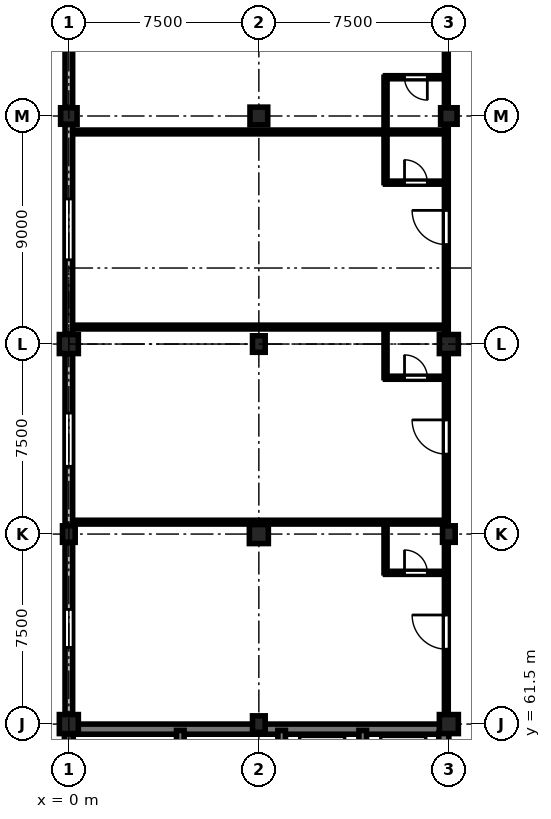
"""IFC4 building model, lengths in metres.
Left out: names, types, materials, properties, quantities, classifications, styles, units other than length and angle.
Written with IfcOpenShell. Run it as: python <this file> out.ifc"""

import sys

from ifc_helpers import new_model, si_unit, direction, frame, frame_2d, origin, origin_2d, place, context, subcontext, project, spatial, rectangle, extrude, element, fill, save


model = new_model("IFC4")
c1 = context("Model", 3, precision=1e-05, world=origin(), true_north=direction((0.0, 1.0)))
c2 = subcontext(c1, "Body", "Model", "MODEL_VIEW")
j1 = project(units=[si_unit("LENGTHUNIT", "METRE"), si_unit("PLANEANGLEUNIT", "RADIAN")], contexts=[c1])
p1 = place(None, origin())
s1 = spatial("IfcSite", under=j1, at=p1, CompositionType="ELEMENT")
p2 = place(p1, origin())
s2 = spatial("IfcBuilding", under=s1, at=p2, CompositionType="ELEMENT")
p3 = place(p2, frame((0.0, 0.0, 14.1)))
s3 = spatial("IfcBuildingStorey", under=s2, at=p3, CompositionType="ELEMENT", Elevation=14.1)
p4 = place(p3, frame((0.0, 61.5, 0.0), z_axis=(0.0, 0.0, 1.0), x_axis=(1.0, 0.0, 0.0)))
e1 = element("IfcColumn", 1, at=p4, inside=s3, PredefinedType="COLUMN", context=c2, shape_type="SweptSolid", body=[
    extrude(rectangle(XDim=0.75, YDim=0.75, at=origin_2d()), origin(), (0.0, 0.0, 1.0), 3.75),
])
p5 = place(p3, frame((0.0, 69.0, 0.0), z_axis=(0.0, 0.0, 1.0), x_axis=(1.0, 0.0, 0.0)))
e2 = element("IfcColumn", 2, at=p5, inside=s3, PredefinedType="COLUMN", context=c2, shape_type="SweptSolid", body=[
    extrude(rectangle(XDim=0.5, YDim=0.65, at=origin_2d()), origin(), (0.0, 0.0, 1.0), 3.75),
])
p6 = place(p3, frame((0.0, 76.5, 0.0), z_axis=(0.0, 0.0, 1.0), x_axis=(1.0, 0.0, 0.0)))
e3 = element("IfcColumn", 3, at=p6, inside=s3, PredefinedType="COLUMN", context=c2, shape_type="SweptSolid", body=[
    extrude(rectangle(XDim=0.75, YDim=0.75, at=origin_2d()), origin(), (0.0, 0.0, 1.0), 3.75),
])
p7 = place(p3, frame((0.0, 85.5, 0.0), z_axis=(0.0, 0.0, 1.0), x_axis=(1.0, 0.0, 0.0)))
e4 = element("IfcColumn", 4, at=p7, inside=s3, PredefinedType="COLUMN", context=c2, shape_type="SweptSolid", body=[
    extrude(rectangle(XDim=0.65, YDim=0.65, at=origin_2d()), origin(), (0.0, 0.0, 1.0), 3.75),
])
p8 = place(p3, frame((7.5, 61.5, 0.0), z_axis=(0.0, 0.0, 1.0), x_axis=(1.0, 0.0, 0.0)))
e5 = element("IfcColumn", 5, at=p8, inside=s3, PredefinedType="COLUMN", context=c2, shape_type="SweptSolid", body=[
    extrude(rectangle(XDim=0.5, YDim=0.65, at=origin_2d()), origin(), (0.0, 0.0, 1.0), 3.75),
])
p9 = place(p3, frame((7.5, 69.0, 0.0), z_axis=(0.0, 0.0, 1.0), x_axis=(1.0, 0.0, 0.0)))
e6 = element("IfcColumn", 6, at=p9, inside=s3, PredefinedType="COLUMN", context=c2, shape_type="SweptSolid", body=[
    extrude(rectangle(XDim=0.75, YDim=0.75, at=origin_2d()), origin(), (0.0, 0.0, 1.0), 3.75),
])
p10 = place(p3, frame((7.5, 76.5, 0.0), z_axis=(0.0, 0.0, 1.0), x_axis=(1.0, 0.0, 0.0)))
e7 = element("IfcColumn", 7, at=p10, inside=s3, PredefinedType="COLUMN", context=c2, shape_type="SweptSolid", body=[
    extrude(rectangle(XDim=0.5, YDim=0.65, at=origin_2d()), origin(), (0.0, 0.0, 1.0), 3.75),
])
p11 = place(p3, frame((7.5, 85.5, 0.0), z_axis=(0.0, 0.0, 1.0), x_axis=(1.0, 0.0, 0.0)))
e8 = element("IfcColumn", 8, at=p11, inside=s3, PredefinedType="COLUMN", context=c2, shape_type="SweptSolid", body=[
    extrude(rectangle(XDim=0.7, YDim=0.7, at=origin_2d()), origin(), (0.0, 0.0, 1.0), 3.75),
])
p12 = place(p3, frame((15.0, 61.5, 0.0), z_axis=(0.0, 0.0, 1.0), x_axis=(1.0, 0.0, 0.0)))
e9 = element("IfcColumn", 9, at=p12, inside=s3, PredefinedType="COLUMN", context=c2, shape_type="SweptSolid", body=[
    extrude(rectangle(XDim=0.75, YDim=0.75, at=origin_2d()), origin(), (0.0, 0.0, 1.0), 3.75),
])
p13 = place(p3, frame((15.0, 69.0, 0.0), z_axis=(0.0, 0.0, 1.0), x_axis=(1.0, 0.0, 0.0)))
e10 = element("IfcColumn", 10, at=p13, inside=s3, PredefinedType="COLUMN", context=c2, shape_type="SweptSolid", body=[
    extrude(rectangle(XDim=0.5, YDim=0.65, at=origin_2d()), origin(), (0.0, 0.0, 1.0), 3.75),
])
p14 = place(p3, frame((15.0, 76.5, 0.0), z_axis=(0.0, 0.0, 1.0), x_axis=(1.0, 0.0, 0.0)))
e11 = element("IfcColumn", 11, at=p14, inside=s3, PredefinedType="COLUMN", context=c2, shape_type="SweptSolid", body=[
    extrude(rectangle(XDim=0.75, YDim=0.75, at=origin_2d()), origin(), (0.0, 0.0, 1.0), 3.75),
])
p15 = place(p3, frame((15.0, 85.5, 0.0), z_axis=(0.0, 0.0, 1.0), x_axis=(1.0, 0.0, 0.0)))
e12 = element("IfcColumn", 12, at=p15, inside=s3, PredefinedType="COLUMN", context=c2, shape_type="SweptSolid", body=[
    extrude(rectangle(XDim=0.65, YDim=0.65, at=origin_2d()), origin(), (0.0, 0.0, 1.0), 3.75),
])
p16 = place(p3, frame((0.0, 54.335, 0.0), z_axis=(0.0, 0.0, 1.0), x_axis=(0.0, 1.0, 0.0)))
e13 = element("IfcWall", 13, at=p16, inside=s3, PredefinedType="SHEAR", context=c2, shape_type="SweptSolid", body=[
    extrude(rectangle(XDim=6.78, YDim=0.35, at=frame_2d((3.39, 0.0))), origin(), (0.0, 0.0, 1.0), 3.47),
])
p17 = place(p3, frame((0.0, 61.885, 0.0), z_axis=(0.0, 0.0, 1.0), x_axis=(0.0, 1.0, 0.0)))
e14 = element("IfcWall", 14, at=p17, inside=s3, PredefinedType="STANDARD", context=c2, shape_type="SweptSolid", body=[
    extrude(rectangle(XDim=6.78, YDim=0.3, at=frame_2d((3.39, 0.0))), origin(), (0.0, 0.0, 1.0), 2.87),
])
p18 = place(p17, frame((2.64, 0.0, 0.9)))
e15 = element("IfcOpeningElement", 15, at=p18, cuts=e14, PredefinedType="OPENING", context=c2, shape_type="SweptSolid", body=[
    extrude(rectangle(XDim=1.5, YDim=1.69, at=frame_2d((0.75, 0.845))), frame((0.0, 0.16, 0.0), z_axis=(0.0, -1.0, 0.0), x_axis=(1.0, 0.0, 0.0)), (0.0, 0.0, 1.0), 0.32),
])
p19 = place(p3, frame((0.0, 69.335, 0.0), z_axis=(0.0, 0.0, 1.0), x_axis=(0.0, 1.0, 0.0)))
e16 = element("IfcWall", 16, at=p19, inside=s3, PredefinedType="STANDARD", context=c2, shape_type="SweptSolid", body=[
    extrude(rectangle(XDim=6.78, YDim=0.3, at=frame_2d((3.39, 0.0))), origin(), (0.0, 0.0, 1.0), 2.87),
])
p20 = place(p19, frame((2.34, 0.0, 0.9)))
e17 = element("IfcOpeningElement", 17, at=p20, cuts=e16, PredefinedType="OPENING", context=c2, shape_type="SweptSolid", body=[
    extrude(rectangle(XDim=2.1, YDim=1.69, at=frame_2d((1.05, 0.845))), frame((0.0, 0.16, 0.0), z_axis=(0.0, -1.0, 0.0), x_axis=(1.0, 0.0, 0.0)), (0.0, 0.0, 1.0), 0.32),
])
p21 = place(p3, frame((0.0, 76.885, 0.0), z_axis=(0.0, 0.0, 1.0), x_axis=(0.0, 1.0, 0.0)))
e18 = element("IfcWall", 18, at=p21, inside=s3, PredefinedType="STANDARD", context=c2, shape_type="SweptSolid", body=[
    extrude(rectangle(XDim=8.28, YDim=0.3, at=frame_2d((4.14, 0.0))), origin(), (0.0, 0.0, 1.0), 2.92),
])
p22 = place(p21, frame((2.94, 0.0, 0.9)))
e19 = element("IfcOpeningElement", 19, at=p22, cuts=e18, PredefinedType="OPENING", context=c2, shape_type="SweptSolid", body=[
    extrude(rectangle(XDim=2.4, YDim=1.74, at=frame_2d((1.2, 0.87))), frame((0.0, 0.16, 0.0), z_axis=(0.0, -1.0, 0.0), x_axis=(1.0, 0.0, 0.0)), (0.0, 0.0, 1.0), 0.32),
])
p23 = place(p3, frame((0.0, 85.835, 0.0), z_axis=(0.0, 0.0, 1.0), x_axis=(0.0, 1.0, 0.0)))
e20 = element("IfcWall", 20, at=p23, inside=s3, PredefinedType="STANDARD", context=c2, shape_type="SweptSolid", body=[
    extrude(rectangle(XDim=6.855, YDim=0.3, at=frame_2d((3.427, 0.0))), origin(), (0.0, 0.0, 1.0), 2.87),
])
p24 = place(p23, frame((2.528, 0.0, 0.9)))
e21 = element("IfcOpeningElement", 21, at=p24, cuts=e20, PredefinedType="OPENING", context=c2, shape_type="SweptSolid", body=[
    extrude(rectangle(XDim=1.8, YDim=1.69, at=frame_2d((0.9, 0.845))), frame((0.0, 0.16, 0.0), z_axis=(0.0, -1.0, 0.0), x_axis=(1.0, 0.0, 0.0)), (0.0, 0.0, 1.0), 0.32),
])
p25 = place(p3, frame((0.35, 61.3, 0.0), z_axis=(0.0, 0.0, 1.0), x_axis=(1.0, 0.0, 0.0)))
e22 = element("IfcWall", 22, at=p25, inside=s3, PredefinedType="SHEAR", context=c2, shape_type="SweptSolid", body=[
    extrude(rectangle(XDim=14.3, YDim=0.4, at=frame_2d((7.15, 0.0))), origin(), (0.0, 0.0, 1.0), 3.47),
])
p26 = place(p3, frame((14.8, 58.1, 0.0), z_axis=(0.0, 0.0, 1.0), x_axis=(0.0, 1.0, 0.0)))
e23 = element("IfcWall", 23, at=p26, inside=s3, PredefinedType="SHEAR", context=c2, shape_type="SweptSolid", body=[
    extrude(rectangle(XDim=3.05, YDim=0.4, at=frame_2d((1.525, 0.0))), origin(), (0.0, 0.0, 1.0), 3.47),
])
for number, where, z_axis, x_axis in (
    (24, (4.4, 58.1, 0.0), (0.0, 0.0, 1.0), (0.0, 1.0, 0.0)),
    (25, (8.4, 58.1, 0.0), (0.0, 0.0, 1.0), (0.0, 1.0, 0.0)),
    (26, (11.6, 58.1, 0.0), (0.0, 0.0, 1.0), (0.0, 1.0, 0.0)),
):
    element("IfcWall", number, at=place(p3, frame(where, z_axis=z_axis, x_axis=x_axis)), inside=s3, PredefinedType="SHEAR", context=c2, shape_type="SweptSolid", body=[
        extrude(rectangle(XDim=3.15, YDim=0.3, at=frame_2d((1.575, 0.0))), origin(), (0.0, 0.0, 1.0), 3.47),
    ])
p27 = place(p3, frame((14.9, 61.93, 0.0), z_axis=(0.0, 0.0, 1.0), x_axis=(0.0, 1.0, 0.0)))
e27 = element("IfcWall", 27, at=p27, inside=s3, PredefinedType="PARTITIONING", context=c2, shape_type="SweptSolid", body=[
    extrude(rectangle(XDim=7.54, YDim=0.15, at=frame_2d((3.77, 0.0))), origin(), (0.0, 0.0, 1.0), 2.905),
])
p28 = place(p27, frame((2.526, 0.0, 0.0)))
e28 = element("IfcOpeningElement", 28, at=p28, cuts=e27, PredefinedType="OPENING", context=c2, shape_type="SweptSolid", body=[
    extrude(rectangle(XDim=1.35, YDim=2.25, at=frame_2d((0.675, 1.125))), frame((0.0, 0.085, 0.0), z_axis=(0.0, -1.0, 0.0), x_axis=(1.0, 0.0, 0.0)), (0.0, 0.0, 1.0), 0.17),
])
p29 = place(p3, frame((12.5, 67.47, 0.0), z_axis=(0.0, 0.0, 1.0), x_axis=(1.0, 0.0, 0.0)))
e29 = element("IfcWall", 29, at=p29, inside=s3, PredefinedType="PARTITIONING", context=c2, shape_type="SweptSolid", body=[
    extrude(rectangle(XDim=2.4, YDim=0.12, at=frame_2d((1.2, 0.0))), origin(), (0.0, 0.0, 1.0), 3.455),
])
p30 = place(p29, frame((0.75, 0.0, 0.0)))
e30 = element("IfcOpeningElement", 30, at=p30, cuts=e29, PredefinedType="OPENING", context=c2, shape_type="SweptSolid", body=[
    extrude(rectangle(XDim=0.9, YDim=2.1, at=frame_2d((0.45, 1.05))), frame((0.0, 0.07, 0.0), z_axis=(0.0, -1.0, 0.0), x_axis=(1.0, 0.0, 0.0)), (0.0, 0.0, 1.0), 0.14),
])
p31 = place(p3, frame((12.5, 67.47, 0.0), z_axis=(0.0, 0.0, 1.0), x_axis=(0.0, 1.0, 0.0)))
e31 = element("IfcWall", 31, at=p31, inside=s3, PredefinedType="PARTITIONING", context=c2, shape_type="SweptSolid", body=[
    extrude(rectangle(XDim=2.0, YDim=0.12, at=frame_2d((1.0, 0.0))), origin(), (0.0, 0.0, 1.0), 3.455),
])
p32 = place(p3, frame((14.9, 69.63, 0.0), z_axis=(0.0, 0.0, 1.0), x_axis=(0.0, 1.0, 0.0)))
e32 = element("IfcWall", 32, at=p32, inside=s3, PredefinedType="PARTITIONING", context=c2, shape_type="SweptSolid", body=[
    extrude(rectangle(XDim=7.54, YDim=0.15, at=frame_2d((3.77, 0.0))), origin(), (0.0, 0.0, 1.0), 2.755),
])
p33 = place(p32, frame((2.526, 0.0, 0.0)))
e33 = element("IfcOpeningElement", 33, at=p33, cuts=e32, PredefinedType="OPENING", context=c2, shape_type="SweptSolid", body=[
    extrude(rectangle(XDim=1.35, YDim=2.25, at=frame_2d((0.675, 1.125))), frame((0.0, 0.085, 0.0), z_axis=(0.0, -1.0, 0.0), x_axis=(1.0, 0.0, 0.0)), (0.0, 0.0, 1.0), 0.17),
])
p34 = place(p3, frame((12.5, 75.17, 0.0), z_axis=(0.0, 0.0, 1.0), x_axis=(1.0, 0.0, 0.0)))
e34 = element("IfcWall", 34, at=p34, inside=s3, PredefinedType="PARTITIONING", context=c2, shape_type="SweptSolid", body=[
    extrude(rectangle(XDim=2.4, YDim=0.12, at=frame_2d((1.2, 0.0))), origin(), (0.0, 0.0, 1.0), 3.455),
])
p35 = place(p34, frame((0.75, 0.0, 0.0)))
e35 = element("IfcOpeningElement", 35, at=p35, cuts=e34, PredefinedType="OPENING", context=c2, shape_type="SweptSolid", body=[
    extrude(rectangle(XDim=0.9, YDim=2.1, at=frame_2d((0.45, 1.05))), frame((0.0, 0.07, 0.0), z_axis=(0.0, -1.0, 0.0), x_axis=(1.0, 0.0, 0.0)), (0.0, 0.0, 1.0), 0.14),
])
p36 = place(p3, frame((12.5, 75.17, 0.0), z_axis=(0.0, 0.0, 1.0), x_axis=(0.0, 1.0, 0.0)))
e36 = element("IfcWall", 36, at=p36, inside=s3, PredefinedType="PARTITIONING", context=c2, shape_type="SweptSolid", body=[
    extrude(rectangle(XDim=2.0, YDim=0.12, at=frame_2d((1.0, 0.0))), origin(), (0.0, 0.0, 1.0), 3.455),
])
p37 = place(p3, frame((14.9, 77.33, 0.0), z_axis=(0.0, 0.0, 1.0), x_axis=(0.0, 1.0, 0.0)))
e37 = element("IfcWall", 37, at=p37, inside=s3, PredefinedType="PARTITIONING", context=c2, shape_type="SweptSolid", body=[
    extrude(rectangle(XDim=7.54, YDim=0.15, at=frame_2d((3.77, 0.0))), origin(), (0.0, 0.0, 1.0), 2.755),
])
p38 = place(p37, frame((3.095, 0.0, 0.0)))
e38 = element("IfcOpeningElement", 38, at=p38, cuts=e37, PredefinedType="OPENING", context=c2, shape_type="SweptSolid", body=[
    extrude(rectangle(XDim=1.35, YDim=2.25, at=frame_2d((0.675, 1.125))), frame((0.0, 0.085, 0.0), z_axis=(0.0, -1.0, 0.0), x_axis=(1.0, 0.0, 0.0)), (0.0, 0.0, 1.0), 0.17),
])
p39 = place(p3, frame((12.5, 82.87, 0.0), z_axis=(0.0, 0.0, 1.0), x_axis=(1.0, 0.0, 0.0)))
e39 = element("IfcWall", 39, at=p39, inside=s3, PredefinedType="PARTITIONING", context=c2, shape_type="SweptSolid", body=[
    extrude(rectangle(XDim=2.4, YDim=0.12, at=frame_2d((1.2, 0.0))), origin(), (0.0, 0.0, 1.0), 3.455),
])
p40 = place(p39, frame((0.75, 0.0, 0.0)))
e40 = element("IfcOpeningElement", 40, at=p40, cuts=e39, PredefinedType="OPENING", context=c2, shape_type="SweptSolid", body=[
    extrude(rectangle(XDim=0.9, YDim=2.1, at=frame_2d((0.45, 1.05))), frame((0.0, 0.07, 0.0), z_axis=(0.0, -1.0, 0.0), x_axis=(1.0, 0.0, 0.0)), (0.0, 0.0, 1.0), 0.14),
])
p41 = place(p3, frame((12.5, 82.87, 0.0), z_axis=(0.0, 0.0, 1.0), x_axis=(0.0, 1.0, 0.0)))
e41 = element("IfcWall", 41, at=p41, inside=s3, PredefinedType="PARTITIONING", context=c2, shape_type="SweptSolid", body=[
    extrude(rectangle(XDim=2.0, YDim=0.12, at=frame_2d((1.0, 0.0))), origin(), (0.0, 0.0, 1.0), 3.455),
])
p42 = place(p3, frame((14.9, 85.03, 0.0), z_axis=(0.0, 0.0, 1.0), x_axis=(0.0, 1.0, 0.0)))
e42 = element("IfcWall", 42, at=p42, inside=s3, PredefinedType="PARTITIONING", context=c2, shape_type="SweptSolid", body=[
    extrude(rectangle(XDim=7.54, YDim=0.15, at=frame_2d((3.77, 0.0))), origin(), (0.0, 0.0, 1.0), 2.755),
])
p43 = place(p42, frame((3.664, 0.0, 0.0)))
e43 = element("IfcOpeningElement", 43, at=p43, cuts=e42, PredefinedType="OPENING", context=c2, shape_type="SweptSolid", body=[
    extrude(rectangle(XDim=1.35, YDim=2.25, at=frame_2d((0.675, 1.125))), frame((0.0, 0.085, 0.0), z_axis=(0.0, -1.0, 0.0), x_axis=(1.0, 0.0, 0.0)), (0.0, 0.0, 1.0), 0.17),
])
p44 = place(p3, frame((14.9, 87.03, 0.0), z_axis=(0.0, 0.0, 1.0), x_axis=(-1.0, 0.0, 0.0)))
e44 = element("IfcWall", 44, at=p44, inside=s3, PredefinedType="PARTITIONING", context=c2, shape_type="SweptSolid", body=[
    extrude(rectangle(XDim=2.4, YDim=0.12, at=frame_2d((1.2, 0.0))), origin(), (0.0, 0.0, 1.0), 3.455),
])
p45 = place(p44, frame((0.75, 0.0, 0.0)))
e45 = element("IfcOpeningElement", 45, at=p45, cuts=e44, PredefinedType="OPENING", context=c2, shape_type="SweptSolid", body=[
    extrude(rectangle(XDim=0.9, YDim=2.1, at=frame_2d((0.45, 1.05))), frame((0.0, 0.07, 0.0), z_axis=(0.0, -1.0, 0.0), x_axis=(1.0, 0.0, 0.0)), (0.0, 0.0, 1.0), 0.14),
])
p46 = place(p3, frame((12.5, 85.03, 0.0), z_axis=(0.0, 0.0, 1.0), x_axis=(0.0, 1.0, 0.0)))
e46 = element("IfcWall", 46, at=p46, inside=s3, PredefinedType="PARTITIONING", context=c2, shape_type="SweptSolid", body=[
    extrude(rectangle(XDim=2.0, YDim=0.12, at=frame_2d((1.0, 0.0))), origin(), (0.0, 0.0, 1.0), 3.455),
])
for number, where, z_axis, x_axis in (
    (47, (0.35, 69.47, 0.0), (0.0, 0.0, 1.0), (1.0, 0.0, 0.0)),
    (48, (0.35, 77.17, 0.0), (0.0, 0.0, 1.0), (1.0, 0.0, 0.0)),
    (49, (0.35, 84.87, 0.0), (0.0, 0.0, 1.0), (1.0, 0.0, 0.0)),
):
    element("IfcWall", number, at=place(p3, frame(where, z_axis=z_axis, x_axis=x_axis)), inside=s3, PredefinedType="PARTITIONING", context=c2, shape_type="SweptSolid", body=[
        extrude(rectangle(XDim=14.55, YDim=0.15, at=frame_2d((7.275, 0.0))), origin(), (0.0, 0.0, 1.0), 3.455),
    ])
p47 = place(p18, origin())
e50 = element("IfcWindow", 50, at=p47, inside=s3, PartitioningType="SINGLE_PANEL", PredefinedType="WINDOW", context=c2, shape_type="SweptSolid", body=[
    extrude(rectangle(XDim=1.5, YDim=1.69, at=frame_2d((0.75, 0.845))), frame((0.0, 0.03, 0.0), z_axis=(0.0, -1.0, 0.0), x_axis=(1.0, 0.0, 0.0)), (0.0, 0.0, 1.0), 0.06),
])
fill(e15, e50)
p48 = place(p20, origin())
e51 = element("IfcWindow", 51, at=p48, inside=s3, PartitioningType="SINGLE_PANEL", PredefinedType="WINDOW", context=c2, shape_type="SweptSolid", body=[
    extrude(rectangle(XDim=2.1, YDim=1.69, at=frame_2d((1.05, 0.845))), frame((0.0, 0.03, 0.0), z_axis=(0.0, -1.0, 0.0), x_axis=(1.0, 0.0, 0.0)), (0.0, 0.0, 1.0), 0.06),
])
fill(e17, e51)
p49 = place(p22, origin())
e52 = element("IfcWindow", 52, at=p49, inside=s3, PartitioningType="SINGLE_PANEL", PredefinedType="WINDOW", context=c2, shape_type="SweptSolid", body=[
    extrude(rectangle(XDim=2.4, YDim=1.74, at=frame_2d((1.2, 0.87))), frame((0.0, 0.03, 0.0), z_axis=(0.0, -1.0, 0.0), x_axis=(1.0, 0.0, 0.0)), (0.0, 0.0, 1.0), 0.06),
])
fill(e19, e52)
p50 = place(p28, origin())
e53 = element("IfcDoor", 53, at=p50, inside=s3, OperationType="SINGLE_SWING_RIGHT", PredefinedType="DOOR", context=c2, shape_type="SweptSolid", body=[
    extrude(rectangle(XDim=1.35, YDim=2.25, at=frame_2d((0.675, 1.125))), frame((0.0, 0.025, 0.0), z_axis=(0.0, -1.0, 0.0), x_axis=(1.0, 0.0, 0.0)), (0.0, 0.0, 1.0), 0.05),
])
fill(e28, e53)
p51 = place(p30, origin())
e54 = element("IfcDoor", 54, at=p51, inside=s3, OperationType="SINGLE_SWING_LEFT", PredefinedType="DOOR", context=c2, shape_type="SweptSolid", body=[
    extrude(rectangle(XDim=0.9, YDim=2.1, at=frame_2d((0.45, 1.05))), frame((0.0, 0.025, 0.0), z_axis=(0.0, -1.0, 0.0), x_axis=(1.0, 0.0, 0.0)), (0.0, 0.0, 1.0), 0.05),
])
fill(e30, e54)
p52 = place(p33, origin())
e55 = element("IfcDoor", 55, at=p52, inside=s3, OperationType="SINGLE_SWING_RIGHT", PredefinedType="DOOR", context=c2, shape_type="SweptSolid", body=[
    extrude(rectangle(XDim=1.35, YDim=2.25, at=frame_2d((0.675, 1.125))), frame((0.0, 0.025, 0.0), z_axis=(0.0, -1.0, 0.0), x_axis=(1.0, 0.0, 0.0)), (0.0, 0.0, 1.0), 0.05),
])
fill(e33, e55)
p53 = place(p35, origin())
e56 = element("IfcDoor", 56, at=p53, inside=s3, OperationType="SINGLE_SWING_LEFT", PredefinedType="DOOR", context=c2, shape_type="SweptSolid", body=[
    extrude(rectangle(XDim=0.9, YDim=2.1, at=frame_2d((0.45, 1.05))), frame((0.0, 0.025, 0.0), z_axis=(0.0, -1.0, 0.0), x_axis=(1.0, 0.0, 0.0)), (0.0, 0.0, 1.0), 0.05),
])
fill(e35, e56)
p54 = place(p38, origin())
e57 = element("IfcDoor", 57, at=p54, inside=s3, OperationType="SINGLE_SWING_RIGHT", PredefinedType="DOOR", context=c2, shape_type="SweptSolid", body=[
    extrude(rectangle(XDim=1.35, YDim=2.25, at=frame_2d((0.675, 1.125))), frame((0.0, 0.025, 0.0), z_axis=(0.0, -1.0, 0.0), x_axis=(1.0, 0.0, 0.0)), (0.0, 0.0, 1.0), 0.05),
])
fill(e38, e57)
p55 = place(p40, origin())
e58 = element("IfcDoor", 58, at=p55, inside=s3, OperationType="SINGLE_SWING_LEFT", PredefinedType="DOOR", context=c2, shape_type="SweptSolid", body=[
    extrude(rectangle(XDim=0.9, YDim=2.1, at=frame_2d((0.45, 1.05))), frame((0.0, 0.025, 0.0), z_axis=(0.0, -1.0, 0.0), x_axis=(1.0, 0.0, 0.0)), (0.0, 0.0, 1.0), 0.05),
])
fill(e40, e58)
p56 = place(p45, origin())
e59 = element("IfcDoor", 59, at=p56, inside=s3, OperationType="SINGLE_SWING_LEFT", PredefinedType="DOOR", context=c2, shape_type="SweptSolid", body=[
    extrude(rectangle(XDim=0.9, YDim=2.1, at=frame_2d((0.45, 1.05))), frame((0.0, 0.025, 0.0), z_axis=(0.0, -1.0, 0.0), x_axis=(1.0, 0.0, 0.0)), (0.0, 0.0, 1.0), 0.05),
])
fill(e45, e59)
save(model, sys.argv[1])
